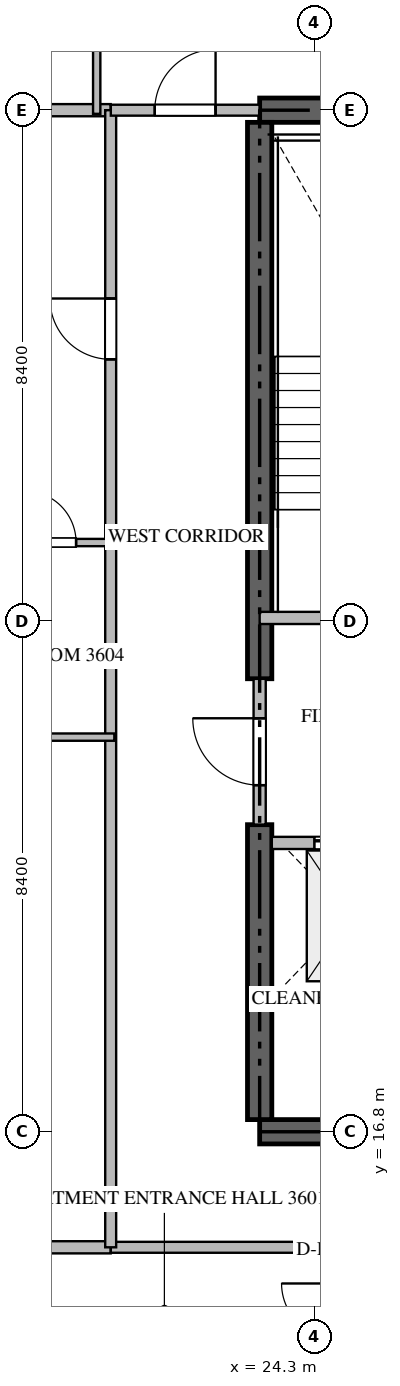
"""IFC4 building model, lengths in metres.
Left out: names, types, materials, properties, quantities, classifications, styles, units other than length and angle.
Written with IfcOpenShell. Run it as: python <this file> out.ifc"""

import sys

from ifc_helpers import new_model, si_unit, direction, frame, frame_2d, origin, place, context, subcontext, project, spatial, rectangle, extrude, source, transform, mapped, element, fill, save


model = new_model("IFC4")
c1 = context("Model", 3, precision=1e-05, world=origin(), true_north=direction((0.0, 1.0)))
c2 = subcontext(c1, "Body", "Model", "MODEL_VIEW")
j1 = project(units=[si_unit("LENGTHUNIT", "METRE"), si_unit("PLANEANGLEUNIT", "RADIAN")], contexts=[c1])
p1 = place(None, origin())
s1 = spatial("IfcSite", under=j1, at=p1, CompositionType="ELEMENT")
p2 = place(p1, origin())
s2 = spatial("IfcBuilding", under=s1, at=p2, CompositionType="ELEMENT")
p3 = place(p2, frame((0.0, 0.0, 146.4)))
s3 = spatial("IfcBuildingStorey", under=s2, at=p3, CompositionType="ELEMENT", Elevation=146.4)
for number, where, z_axis, x_axis in (
    (1, (23.4, 16.8, -0.26), (0.0, 0.0, 1.0), (1.0, 0.0, 0.0)),
    (2, (41.4, 33.6, -0.26), (0.0, 0.0, 1.0), (-1.0, 0.0, 0.0)),
):
    element("IfcWall", number, at=place(p3, frame(where, z_axis=z_axis, x_axis=x_axis)), inside=s3, PredefinedType="SHEAR", context=c2, shape_type="SweptSolid", body=[
        extrude(rectangle(XDim=18.0, YDim=0.4, at=frame_2d((9.0, 0.0))), origin(), (0.0, 0.0, 1.0), 3.748),
    ])
p4 = place(p3, frame((23.4, 17.0, -0.26), z_axis=(0.0, 0.0, 1.0), x_axis=(0.0, 1.0, 0.0)))
e3 = element("IfcWall", 3, at=p4, inside=s3, PredefinedType="SHEAR", context=c2, shape_type="SweptSolid", body=[
    extrude(rectangle(XDim=4.85, YDim=0.4, at=frame_2d((2.425, 0.0))), origin(), (0.0, 0.0, 1.0), 3.748),
])
p5 = place(p3, frame((23.4, 24.25, -0.26), z_axis=(0.0, 0.0, 1.0), x_axis=(0.0, 1.0, 0.0)))
e4 = element("IfcWall", 4, at=p5, inside=s3, PredefinedType="SHEAR", context=c2, shape_type="SweptSolid", body=[
    extrude(rectangle(XDim=9.15, YDim=0.4, at=frame_2d((4.575, 0.0))), origin(), (0.0, 0.0, 1.0), 3.748),
])
p6 = place(p3, frame((23.4, 25.25, 0.0), z_axis=(0.0, 0.0, 1.0), x_axis=(1.0, 0.0, 0.0)))
e5 = element("IfcWall", 5, at=p6, inside=s3, PredefinedType="STANDARD", context=c2, shape_type="SweptSolid", body=[
    extrude(rectangle(XDim=4.45, YDim=0.2, at=frame_2d((2.225, 0.0))), origin(), (0.0, 0.0, 1.0), 3.49),
])
p7 = place(p6, frame((1.65, 0.0, 0.0)))
e6 = element("IfcOpeningElement", 6, at=p7, cuts=e5, PredefinedType="OPENING", context=c2, shape_type="SweptSolid", body=[
    extrude(rectangle(XDim=1.1, YDim=2.15, at=frame_2d((0.55, 1.075))), frame((0.0, 0.11, 0.0), z_axis=(0.0, -1.0, 0.0), x_axis=(1.0, 0.0, 0.0)), (0.0, 0.0, 1.0), 0.22),
])
p8 = place(p3, frame((23.6, 21.55, 0.0), z_axis=(0.0, 0.0, 1.0), x_axis=(1.0, 0.0, 0.0)))
e7 = element("IfcWall", 7, at=p8, inside=s3, PredefinedType="STANDARD", context=c2, shape_type="SweptSolid", body=[
    extrude(rectangle(XDim=2.45, YDim=0.2, at=frame_2d((1.225, 0.0))), origin(), (0.0, 0.0, 1.0), 3.49),
])
p9 = place(p8, frame((0.7, 0.0, 0.0)))
e8 = element("IfcOpeningElement", 8, at=p9, cuts=e7, PredefinedType="OPENING", context=c2, shape_type="SweptSolid", body=[
    extrude(rectangle(XDim=1.2, YDim=2.2, at=frame_2d((0.6, 1.1))), frame((0.0, 0.11, 0.0), z_axis=(0.0, -1.0, 0.0), x_axis=(1.0, 0.0, 0.0)), (0.0, 0.0, 1.0), 0.22),
])
p10 = place(p3, frame((23.6, 19.05, 0.0), z_axis=(0.0, 0.0, 1.0), x_axis=(1.0, 0.0, 0.0)))
e9 = element("IfcWall", 9, at=p10, inside=s3, PredefinedType="STANDARD", context=c2, shape_type="SweptSolid", body=[
    extrude(rectangle(XDim=2.45, YDim=0.2, at=frame_2d((1.225, 0.0))), origin(), (0.0, 0.0, 1.0), 3.49),
])
p11 = place(p3, frame((23.4, 21.852, 0.0), z_axis=(0.0, 0.0, 1.0), x_axis=(0.0, 1.0, 0.0)))
e10 = element("IfcWall", 10, at=p11, inside=s3, PredefinedType="STANDARD", context=c2, shape_type="SweptSolid", body=[
    extrude(rectangle(XDim=2.396, YDim=0.2, at=frame_2d((1.198, 0.0))), origin(), (0.0, 0.0, 1.0), 3.49),
])
p12 = place(p11, frame((0.648, 0.0, 0.0)))
e11 = element("IfcOpeningElement", 11, at=p12, cuts=e10, PredefinedType="OPENING", context=c2, shape_type="SweptSolid", body=[
    extrude(rectangle(XDim=1.1, YDim=2.15, at=frame_2d((0.55, 1.075))), frame((0.0, 0.11, 0.0), z_axis=(0.0, -1.0, 0.0), x_axis=(1.0, 0.0, 0.0)), (0.0, 0.0, 1.0), 0.22),
])
for number, where, z_axis, x_axis in (
    (12, (7.882, 14.9, 0.0), (0.0, 0.0, 1.0), (1.0, 0.0, 0.0)),
    (13, (7.882, 33.6, 0.0), (0.0, 0.0, 1.0), (1.0, 0.0, 0.0)),
):
    element("IfcWall", number, at=place(p3, frame(where, z_axis=z_axis, x_axis=x_axis)), inside=s3, PredefinedType="PARTITIONING", context=c2, shape_type="SweptSolid", body=[
        extrude(rectangle(XDim=13.068, YDim=0.2, at=frame_2d((6.534, 0.0))), origin(), (0.0, 0.0, 1.0), 3.49),
    ])
p13 = place(p3, frame((20.952, 14.9, 0.0), z_axis=(0.0, 0.0, 1.0), x_axis=(1.0, 0.0, 0.0)))
e14 = element("IfcWall", 14, at=p13, inside=s3, PredefinedType="PARTITIONING", context=c2, shape_type="SweptSolid", body=[
    extrude(rectangle(XDim=22.896, YDim=0.18, at=frame_2d((11.448, 0.0))), origin(), (0.0, 0.0, 1.0), 3.49),
])
p14 = place(p13, frame((7.51, 0.0, 0.0)))
e15 = element("IfcOpeningElement", 15, at=p14, cuts=e14, PredefinedType="OPENING", context=c2, shape_type="SweptSolid", body=[
    extrude(rectangle(XDim=1.0, YDim=2.15, at=frame_2d((0.5, 1.075))), frame((0.0, 0.1, 0.0), z_axis=(0.0, -1.0, 0.0), x_axis=(1.0, 0.0, 0.0)), (0.0, 0.0, 1.0), 0.2),
])
p15 = place(p3, frame((20.95, 14.9, 0.0), z_axis=(0.0, 0.0, 1.0), x_axis=(0.0, 1.0, 0.0)))
e16 = element("IfcWall", 16, at=p15, inside=s3, PredefinedType="PARTITIONING", context=c2, shape_type="SweptSolid", body=[
    extrude(rectangle(XDim=18.7, YDim=0.18, at=frame_2d((9.35, 0.0))), origin(), (0.0, 0.0, 1.0), 3.49),
])
p16 = place(p15, frame((14.603, 0.0, 0.0)))
e17 = element("IfcOpeningElement", 17, at=p16, cuts=e16, PredefinedType="OPENING", context=c2, shape_type="SweptSolid", body=[
    extrude(rectangle(XDim=1.0, YDim=2.15, at=frame_2d((0.5, 1.075))), frame((0.0, 0.1, 0.0), z_axis=(0.0, -1.0, 0.0), x_axis=(1.0, 0.0, 0.0)), (0.0, 0.0, 1.0), 0.2),
])
p17 = place(p3, frame((20.952, 33.6, 0.0), z_axis=(0.0, 0.0, 1.0), x_axis=(1.0, 0.0, 0.0)))
e18 = element("IfcWall", 18, at=p17, inside=s3, PredefinedType="PARTITIONING", context=c2, shape_type="SweptSolid", body=[
    extrude(rectangle(XDim=2.446, YDim=0.18, at=frame_2d((1.223, 0.0))), origin(), (0.0, 0.0, 1.0), 3.49),
])
p18 = place(p17, frame((0.723, 0.0, 0.0)))
e19 = element("IfcOpeningElement", 19, at=p18, cuts=e18, PredefinedType="OPENING", context=c2, shape_type="SweptSolid", body=[
    extrude(rectangle(XDim=1.0, YDim=2.15, at=frame_2d((0.5, 1.075))), frame((0.0, 0.1, 0.0), z_axis=(0.0, -1.0, 0.0), x_axis=(1.0, 0.0, 0.0)), (0.0, 0.0, 1.0), 0.2),
])
p19 = place(p3, frame((20.72, 36.35, 0.0), z_axis=(0.0, 0.0, 1.0), x_axis=(0.0, -1.0, 0.0)))
e20 = element("IfcWall", 20, at=p19, inside=s3, PredefinedType="PARTITIONING", context=c2, shape_type="SweptSolid", body=[
    extrude(rectangle(XDim=2.81, YDim=0.12, at=frame_2d((1.405, 0.0))), origin(), (0.0, 0.0, 1.0), 3.49),
])
p20 = place(p3, frame((18.9, 23.29, 0.0), z_axis=(0.0, 0.0, 1.0), x_axis=(1.0, 0.0, 0.0)))
e21 = element("IfcWall", 21, at=p20, inside=s3, PredefinedType="PARTITIONING", context=c2, shape_type="SweptSolid", body=[
    extrude(rectangle(XDim=2.11, YDim=0.12, at=frame_2d((1.055, 0.0))), origin(), (0.0, 0.0, 1.0), 3.49),
])
p21 = place(p3, frame((18.902, 26.49, 0.0), z_axis=(0.0, 0.0, 1.0), x_axis=(1.0, 0.0, 0.0)))
e22 = element("IfcWall", 22, at=p21, inside=s3, PredefinedType="PARTITIONING", context=c2, shape_type="SweptSolid", body=[
    extrude(rectangle(XDim=2.108, YDim=0.12, at=frame_2d((1.054, 0.0))), origin(), (0.0, 0.0, 1.0), 3.49),
])
p22 = place(p21, frame((0.629, 0.0, 0.0)))
e23 = element("IfcOpeningElement", 23, at=p22, cuts=e22, PredefinedType="OPENING", context=c2, shape_type="SweptSolid", body=[
    extrude(rectangle(XDim=0.85, YDim=2.1, at=frame_2d((0.425, 1.05))), frame((0.0, 0.07, 0.0), z_axis=(0.0, -1.0, 0.0), x_axis=(1.0, 0.0, 0.0)), (0.0, 0.0, 1.0), 0.14),
])
m1 = source(origin(), c2, "Body", "SweptSolid", [
    extrude(rectangle(XDim=1.2, YDim=2.2, at=frame_2d((0.6, 1.1))), frame((0.0, 0.025, 0.0), z_axis=(0.0, -1.0, 0.0), x_axis=(1.0, 0.0, 0.0)), (0.0, 0.0, 1.0), 0.05),
])
p23 = place(p9, origin())
e24 = element("IfcDoor", 24, at=p23, inside=s3, OperationType="DOUBLE_DOOR_SLIDING", PredefinedType="DOOR", context=c2, shape_type="MappedRepresentation", body=[
    mapped(m1, transform((0.0, 0.0, 0.0), scale=1.0)),
])
fill(e8, e24)
m2 = source(origin(), c2, "Body", "SweptSolid", [
    extrude(rectangle(XDim=1.1, YDim=2.15, at=frame_2d((0.55, 1.075))), frame((0.0, 0.025, 0.0), z_axis=(0.0, -1.0, 0.0), x_axis=(1.0, 0.0, 0.0)), (0.0, 0.0, 1.0), 0.05),
])
p24 = place(p12, origin())
e25 = element("IfcDoor", 25, at=p24, inside=s3, OperationType="SINGLE_SWING_RIGHT", PredefinedType="DOOR", context=c2, shape_type="MappedRepresentation", body=[
    mapped(m2, transform((0.0, 0.0, 0.0), scale=1.0)),
])
fill(e11, e25)
m3 = source(origin(), c2, "Body", "SweptSolid", [
    extrude(rectangle(XDim=1.0, YDim=2.15, at=frame_2d((0.5, 1.075))), frame((0.0, 0.025, 0.0), z_axis=(0.0, -1.0, 0.0), x_axis=(1.0, 0.0, 0.0)), (0.0, 0.0, 1.0), 0.05),
])
p25 = place(p16, origin())
e26 = element("IfcDoor", 26, at=p25, inside=s3, OperationType="SINGLE_SWING_RIGHT", PredefinedType="DOOR", context=c2, shape_type="MappedRepresentation", body=[
    mapped(m3, transform((0.0, 0.0, 0.0), scale=1.0)),
])
fill(e17, e26)
p26 = place(p18, origin())
e27 = element("IfcDoor", 27, at=p26, inside=s3, OperationType="SINGLE_SWING_RIGHT", PredefinedType="DOOR", context=c2, shape_type="MappedRepresentation", body=[
    mapped(m3, transform((0.0, 0.0, 0.0), scale=1.0)),
])
fill(e19, e27)
m4 = source(origin(), c2, "Body", "SweptSolid", [
    extrude(rectangle(XDim=0.85, YDim=2.1, at=frame_2d((0.425, 1.05))), frame((0.0, 0.025, 0.0), z_axis=(0.0, -1.0, 0.0), x_axis=(1.0, 0.0, 0.0)), (0.0, 0.0, 1.0), 0.05),
])
p27 = place(p22, origin())
e28 = element("IfcDoor", 28, at=p27, inside=s3, OperationType="SINGLE_SWING_LEFT", PredefinedType="DOOR", context=c2, shape_type="MappedRepresentation", body=[
    mapped(m4, transform((0.0, 0.0, 0.0), scale=1.0)),
])
fill(e23, e28)
save(model, sys.argv[1])
